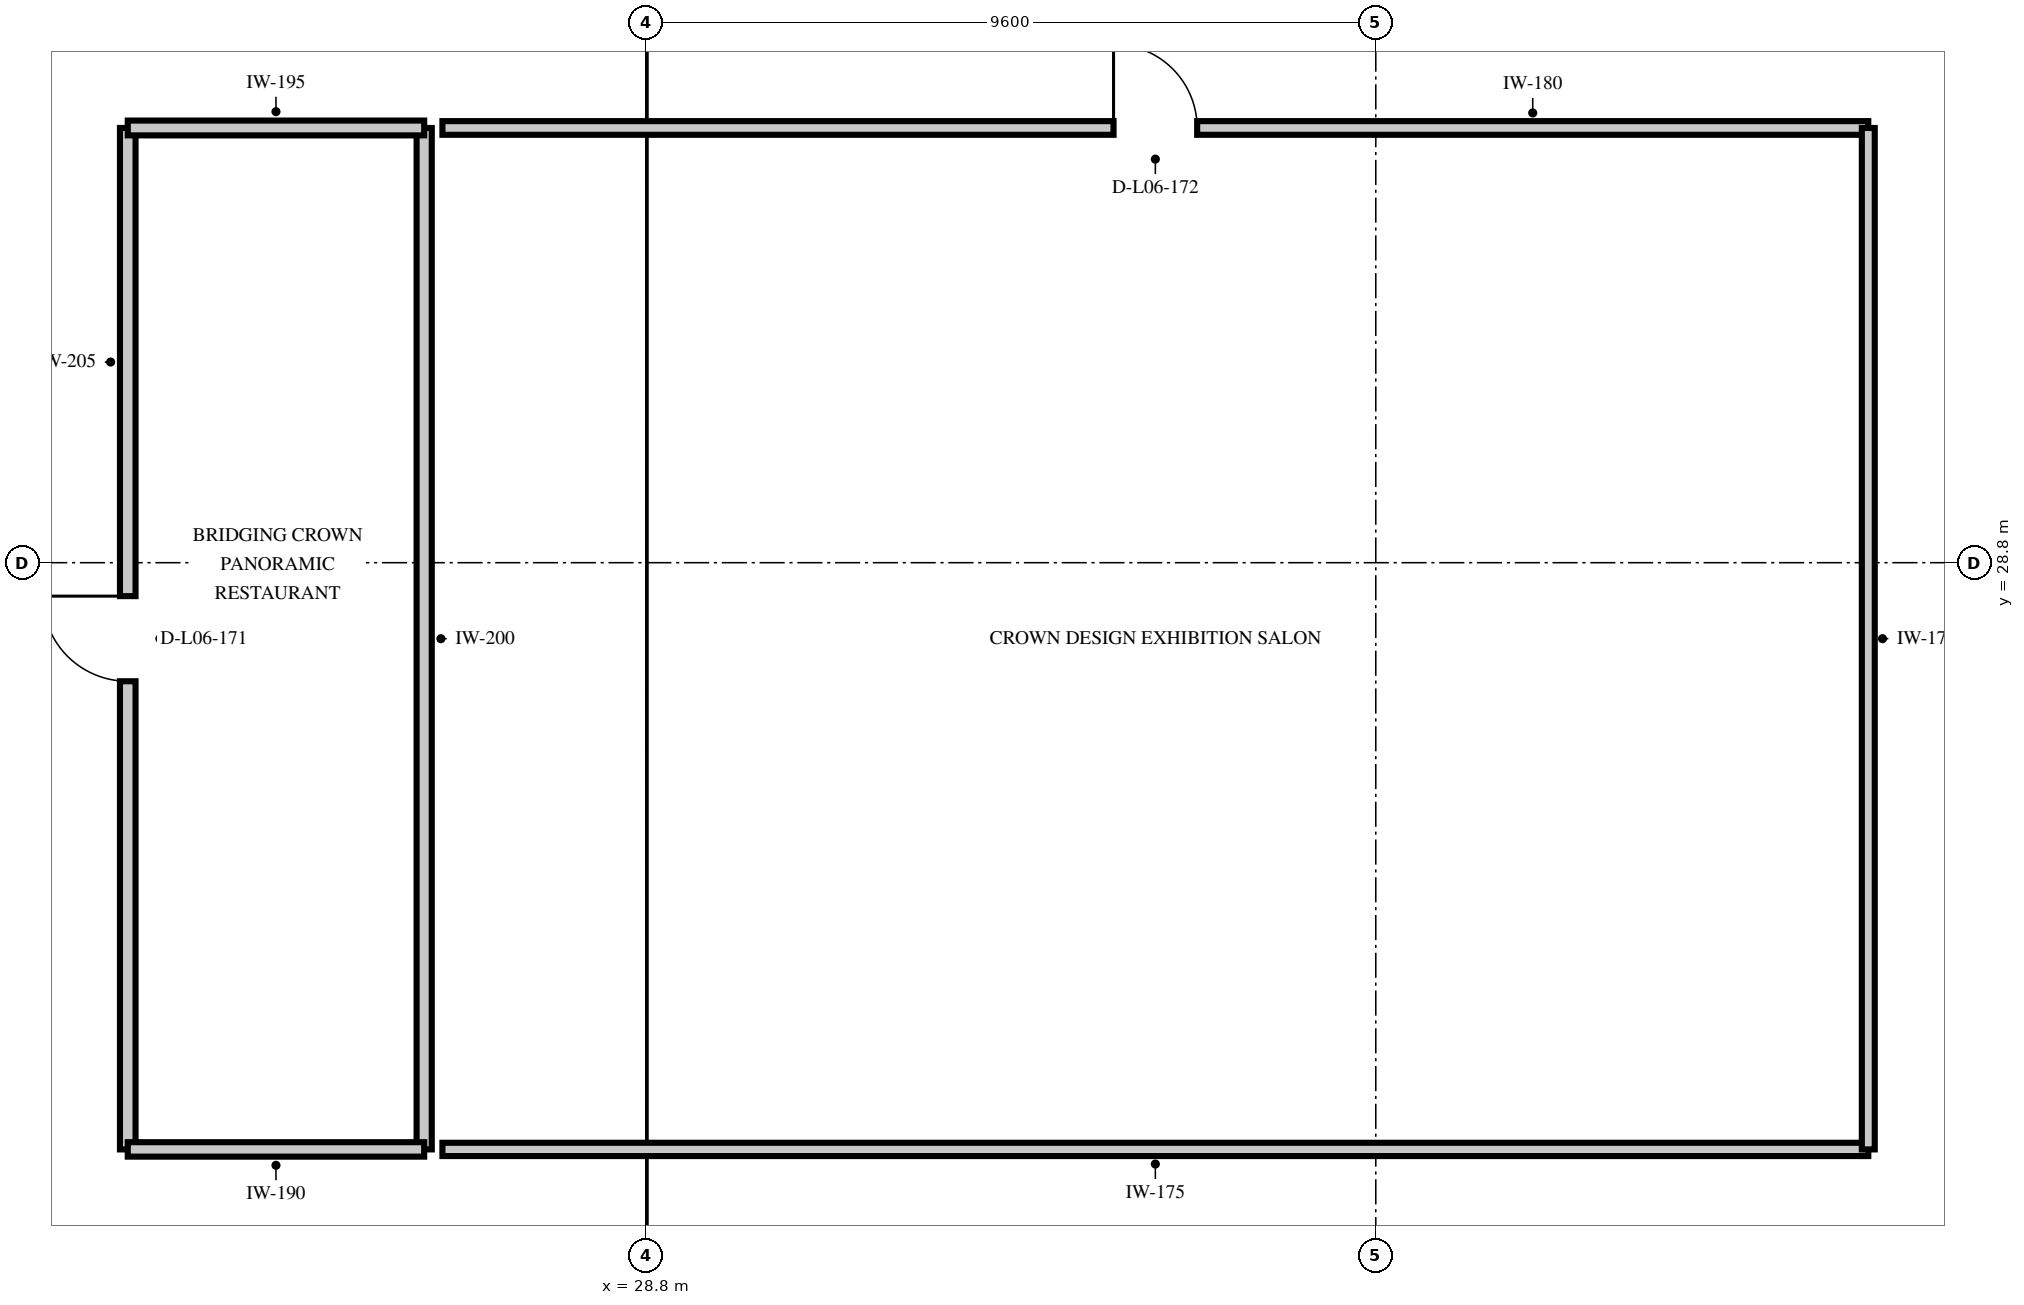
"""IFC4 building model, lengths in metres.
Left out: names, types, materials, properties, quantities, classifications, styles, units other than length and angle.
Written with IfcOpenShell. Run it as: python <this file> out.ifc"""

import sys

from ifc_helpers import new_model, si_unit, direction, frame, frame_2d, origin, place, context, subcontext, project, spatial, rectangle, extrude, element, fill, save


model = new_model("IFC4")
c1 = context("Model", 3, precision=1e-05, world=origin(), true_north=direction((0.0, 1.0)))
c2 = subcontext(c1, "Body", "Model", "MODEL_VIEW")
j1 = project(units=[si_unit("LENGTHUNIT", "METRE"), si_unit("PLANEANGLEUNIT", "RADIAN")], contexts=[c1])
p1 = place(None, origin())
s1 = spatial("IfcSite", under=j1, at=p1, CompositionType="ELEMENT")
p2 = place(p1, origin())
s2 = spatial("IfcBuilding", under=s1, at=p2, CompositionType="ELEMENT")
p3 = place(p2, frame((0.0, 0.0, 29.4)))
s3 = spatial("IfcBuildingStorey", under=s2, at=p3, CompositionType="ELEMENT", Elevation=29.4)
p4 = place(p3, frame((21.98, 21.08, 0.0), z_axis=(0.0, 0.0, 1.0), x_axis=(0.0, 1.0, 0.0)))
e1 = element("IfcWall", 1, at=p4, inside=s3, PredefinedType="PARTITIONING", context=c2, shape_type="SweptSolid", body=[
    extrude(rectangle(XDim=13.44, YDim=0.205, at=frame_2d((6.72, 0.0))), origin(), (0.0, 0.0, 1.0), 2.415),
])
p5 = place(p4, frame((6.16, 0.0, 0.0)))
e2 = element("IfcOpeningElement", 2, at=p5, cuts=e1, PredefinedType="OPENING", context=c2, shape_type="SweptSolid", body=[
    extrude(rectangle(XDim=1.12, YDim=2.18, at=frame_2d((0.56, 1.09))), frame((0.0, 0.115, 0.0), z_axis=(0.0, -1.0, 0.0), x_axis=(1.0, 0.0, 0.0)), (0.0, 0.0, 1.0), 0.229),
])
p6 = place(p3, frame((25.88, 34.52, 0.0), z_axis=(0.0, 0.0, 1.0), x_axis=(0.0, -1.0, 0.0)))
e3 = element("IfcWall", 3, at=p6, inside=s3, PredefinedType="PARTITIONING", context=c2, shape_type="SweptSolid", body=[
    extrude(rectangle(XDim=13.44, YDim=0.2, at=frame_2d((6.72, 0.0))), origin(), (0.0, 0.0, 1.0), 2.415),
])
p7 = place(p3, frame((21.98, 34.52, 0.0), z_axis=(0.0, 0.0, 1.0), x_axis=(1.0, 0.0, 0.0)))
e4 = element("IfcWall", 4, at=p7, inside=s3, PredefinedType="PARTITIONING", context=c2, shape_type="SweptSolid", body=[
    extrude(rectangle(XDim=3.9, YDim=0.195, at=frame_2d((1.95, 0.0))), origin(), (0.0, 0.0, 1.0), 4.525),
])
p8 = place(p3, frame((25.88, 21.08, 0.0), z_axis=(0.0, 0.0, 1.0), x_axis=(-1.0, 0.0, 0.0)))
e5 = element("IfcWall", 5, at=p8, inside=s3, PredefinedType="PARTITIONING", context=c2, shape_type="SweptSolid", body=[
    extrude(rectangle(XDim=3.9, YDim=0.19, at=frame_2d((1.95, 0.0))), origin(), (0.0, 0.0, 1.0), 4.525),
])
p9 = place(p3, frame((26.12, 34.52, 0.0), z_axis=(0.0, 0.0, 1.0), x_axis=(1.0, 0.0, 0.0)))
e6 = element("IfcWall", 6, at=p9, inside=s3, PredefinedType="PARTITIONING", context=c2, shape_type="SweptSolid", body=[
    extrude(rectangle(XDim=18.76, YDim=0.18, at=frame_2d((9.38, 0.0))), origin(), (0.0, 0.0, 1.0), 4.525),
])
p10 = place(p9, frame((8.83, 0.0, 0.0)))
e7 = element("IfcOpeningElement", 7, at=p10, cuts=e6, PredefinedType="OPENING", context=c2, shape_type="SweptSolid", body=[
    extrude(rectangle(XDim=1.1, YDim=2.15, at=frame_2d((0.55, 1.075))), frame((0.0, 0.102, 0.0), z_axis=(0.0, -1.0, 0.0), x_axis=(1.0, 0.0, 0.0)), (0.0, 0.0, 1.0), 0.204),
])
p11 = place(p3, frame((44.88, 21.08, 0.0), z_axis=(0.0, 0.0, 1.0), x_axis=(-1.0, 0.0, 0.0)))
e8 = element("IfcWall", 8, at=p11, inside=s3, PredefinedType="PARTITIONING", context=c2, shape_type="SweptSolid", body=[
    extrude(rectangle(XDim=18.76, YDim=0.175, at=frame_2d((9.38, 0.0))), origin(), (0.0, 0.0, 1.0), 4.525),
])
p12 = place(p3, frame((44.88, 34.52, 0.0), z_axis=(0.0, 0.0, 1.0), x_axis=(0.0, -1.0, 0.0)))
e9 = element("IfcWall", 9, at=p12, inside=s3, PredefinedType="PARTITIONING", context=c2, shape_type="SweptSolid", body=[
    extrude(rectangle(XDim=13.44, YDim=0.17, at=frame_2d((6.72, 0.0))), origin(), (0.0, 0.0, 1.0), 2.415),
])
p13 = place(p5, origin())
e10 = element("IfcDoor", 10, at=p13, inside=s3, OperationType="SINGLE_SWING_RIGHT", PredefinedType="DOOR", context=c2, shape_type="SweptSolid", body=[
    extrude(rectangle(XDim=1.12, YDim=2.18, at=frame_2d((0.56, 1.09))), frame((0.0, 0.025, 0.0), z_axis=(0.0, -1.0, 0.0), x_axis=(1.0, 0.0, 0.0)), (0.0, 0.0, 1.0), 0.05),
])
fill(e2, e10)
p14 = place(p10, origin())
e11 = element("IfcDoor", 11, at=p14, inside=s3, OperationType="SINGLE_SWING_LEFT", PredefinedType="DOOR", context=c2, shape_type="SweptSolid", body=[
    extrude(rectangle(XDim=1.1, YDim=2.15, at=frame_2d((0.55, 1.075))), frame((0.0, 0.025, 0.0), z_axis=(0.0, -1.0, 0.0), x_axis=(1.0, 0.0, 0.0)), (0.0, 0.0, 1.0), 0.05),
])
fill(e7, e11)
save(model, sys.argv[1])
